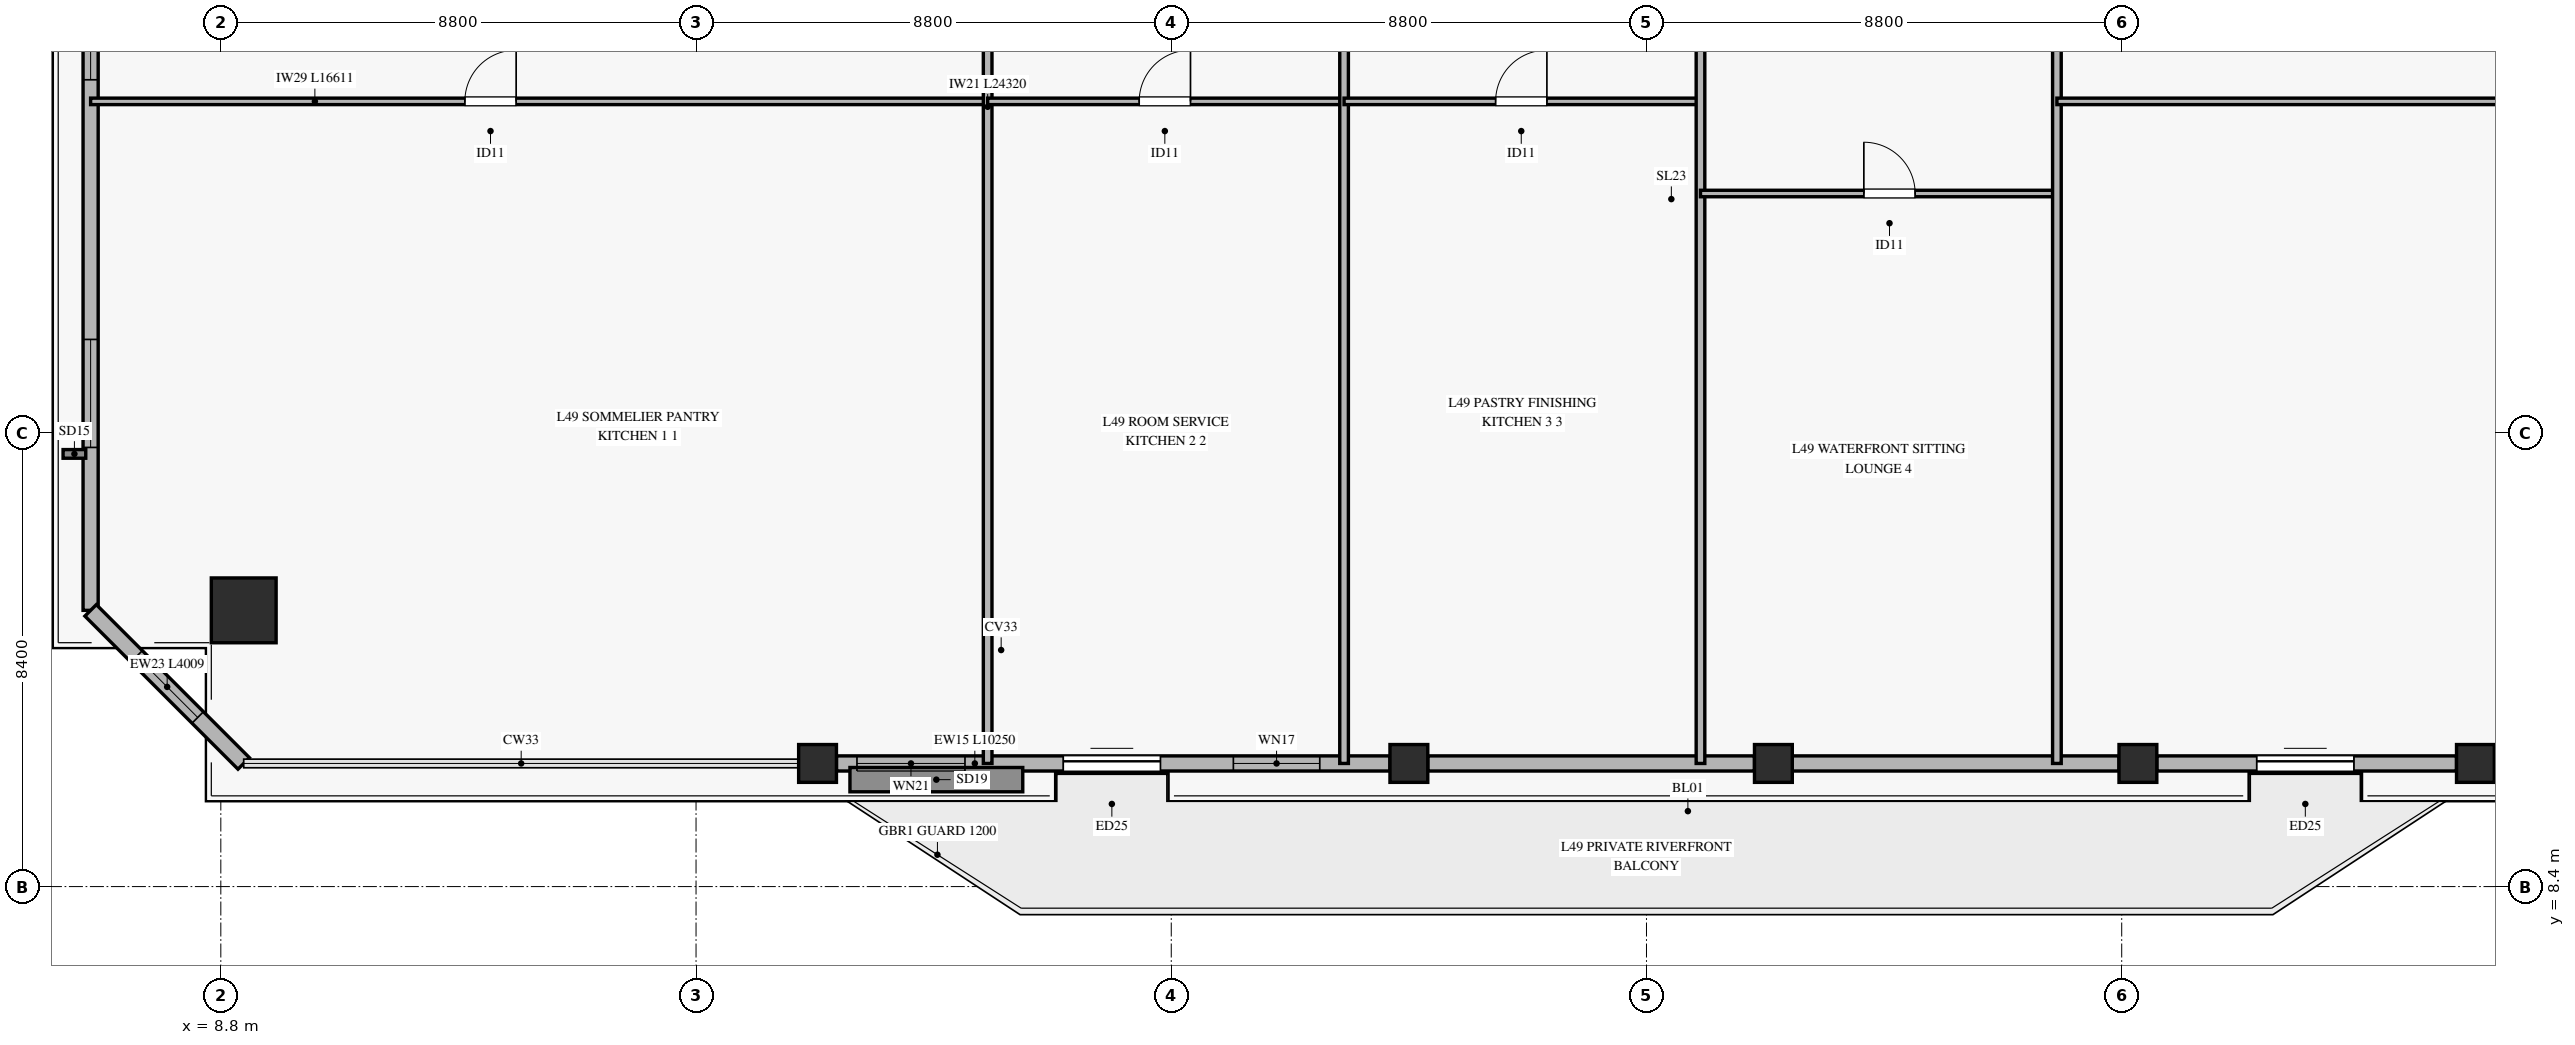
"""IFC4 building model, lengths in metres.
Left out: names, types, materials, properties, quantities, classifications, styles, units other than length and angle.
Written with IfcOpenShell. Run it as: python <this file> out.ifc"""

import sys

from ifc_helpers import new_model, si_unit, direction, frame, frame_2d, origin, origin_2d, place, context, subcontext, project, spatial, rectangle, hollow_rectangle, extrude, source, transform, mapped, element, fill, save


model = new_model("IFC4")
c1 = context("Model", 3, precision=1e-05, world=origin(), true_north=direction((0.0, 1.0)))
c2 = subcontext(c1, "Body", "Model", "MODEL_VIEW")
j1 = project(units=[si_unit("LENGTHUNIT", "METRE"), si_unit("PLANEANGLEUNIT", "RADIAN")], contexts=[c1])
p1 = place(None, origin())
s1 = spatial("IfcSite", under=j1, at=p1, CompositionType="ELEMENT")
p2 = place(p1, origin())
s2 = spatial("IfcBuilding", under=s1, at=p2, CompositionType="ELEMENT")
p3 = place(p2, frame((0.0, 0.0, 195.7)))
s3 = spatial("IfcBuildingStorey", under=s2, at=p3, CompositionType="ELEMENT", Elevation=195.7)
m1 = source(origin(), c2, "Body", "SweptSolid", [
    extrude(hollow_rectangle(XDim=1.2, YDim=1.2, WallThickness=0.055, at=origin_2d()), origin(), (0.0, 0.0, 1.0), 3.27),
])
p4 = place(p3, frame((9.224, 13.515, 0.0), z_axis=(0.0, 0.0, 1.0), x_axis=(1.0, 0.0, 0.0)))
e1 = element("IfcColumn", 1, at=p4, inside=s3, PredefinedType="COLUMN", context=c2, shape_type="MappedRepresentation", body=[
    mapped(m1, transform((0.0, 0.0, 0.0), x_axis=(1.0, 0.0, 0.0), y_axis=(0.0, 1.0, 0.0), z_axis=(0.0, 0.0, 1.0), scale=1.0)),
])
m2 = source(origin(), c2, "Body", "SweptSolid", [
    extrude(hollow_rectangle(XDim=0.7, YDim=0.7, WallThickness=0.032, at=origin_2d()), origin(), (0.0, 0.0, 1.0), 3.27),
])
for number, where, z_axis, x_axis in (
    (2, (19.85, 10.68, 0.0), (0.0, 0.0, 1.0), (1.0, 0.0, 0.0)),
    (3, (30.8, 10.68, 0.0), (0.0, 0.0, 1.0), (1.0, 0.0, 0.0)),
    (4, (37.55, 10.68, 0.0), (0.0, 0.0, 1.0), (1.0, 0.0, 0.0)),
    (5, (44.3, 10.68, 0.0), (0.0, 0.0, 1.0), (1.0, 0.0, 0.0)),
    (6, (50.55, 10.68, 0.0), (0.0, 0.0, 1.0), (1.0, 0.0, 0.0)),
):
    element("IfcColumn", number, at=place(p3, frame(where, z_axis=z_axis, x_axis=x_axis)), inside=s3, PredefinedType="COLUMN", context=c2, shape_type="MappedRepresentation", body=[
        mapped(m2, transform((0.0, 0.0, 0.0), x_axis=(1.0, 0.0, 0.0), y_axis=(0.0, 1.0, 0.0), z_axis=(0.0, 0.0, 1.0), scale=1.0)),
    ])
p5 = place(p3, frame((20.2, 10.68, 0.0), z_axis=(0.0, 0.0, 1.0), x_axis=(1.0, 0.0, 0.0)))
e7 = element("IfcWall", 7, at=p5, inside=s3, PredefinedType="SOLIDWALL", context=c2, shape_type="SweptSolid", body=[
    extrude(rectangle(XDim=10.25, YDim=0.28, at=frame_2d((5.125, 0.0))), origin(), (0.0, 0.0, 1.0), 2.75),
])
p6 = place(p5, frame((4.2, 0.0, 0.0)))
e8 = element("IfcOpeningElement", 8, at=p6, cuts=e7, PredefinedType="OPENING", context=c2, shape_type="SweptSolid", body=[
    extrude(rectangle(XDim=1.8, YDim=2.25, at=frame_2d((0.9, 1.125))), frame((0.0, 0.15, 0.0), z_axis=(0.0, -1.0, 0.0), x_axis=(1.0, 0.0, 0.0)), (0.0, 0.0, 1.0), 0.3),
])
p7 = place(p5, frame((0.38, 0.0, 0.45)))
e9 = element("IfcOpeningElement", 9, at=p7, cuts=e7, PredefinedType="OPENING", context=c2, shape_type="SweptSolid", body=[
    extrude(rectangle(XDim=2.0, YDim=2.0, at=frame_2d((1.0, 1.0))), frame((0.0, 0.15, 0.0), z_axis=(0.0, -1.0, 0.0), x_axis=(1.0, 0.0, 0.0)), (0.0, 0.0, 1.0), 0.3),
])
p8 = place(p5, frame((7.35, 0.0, 0.45)))
e10 = element("IfcOpeningElement", 10, at=p8, cuts=e7, PredefinedType="OPENING", context=c2, shape_type="SweptSolid", body=[
    extrude(rectangle(XDim=1.6, YDim=2.0, at=frame_2d((0.8, 1.0))), frame((0.0, 0.15, 0.0), z_axis=(0.0, -1.0, 0.0), x_axis=(1.0, 0.0, 0.0)), (0.0, 0.0, 1.0), 0.3),
])
for number, where, z_axis, x_axis in (
    (11, (31.15, 10.68, 0.0), (0.0, 0.0, 1.0), (1.0, 0.0, 0.0)),
    (12, (37.9, 10.68, 0.0), (0.0, 0.0, 1.0), (1.0, 0.0, 0.0)),
):
    element("IfcWall", number, at=place(p3, frame(where, z_axis=z_axis, x_axis=x_axis)), inside=s3, PredefinedType="SOLIDWALL", context=c2, shape_type="SweptSolid", body=[
        extrude(rectangle(XDim=6.05, YDim=0.28, at=frame_2d((3.025, 0.0))), origin(), (0.0, 0.0, 1.0), 2.75),
    ])
p9 = place(p3, frame((44.65, 10.68, 0.0), z_axis=(0.0, 0.0, 1.0), x_axis=(1.0, 0.0, 0.0)))
e13 = element("IfcWall", 13, at=p9, inside=s3, PredefinedType="SOLIDWALL", context=c2, shape_type="SweptSolid", body=[
    extrude(rectangle(XDim=5.55, YDim=0.28, at=frame_2d((2.775, 0.0))), origin(), (0.0, 0.0, 1.0), 2.75),
])
p10 = place(p9, frame((1.85, 0.0, 0.0)))
e14 = element("IfcOpeningElement", 14, at=p10, cuts=e13, PredefinedType="OPENING", context=c2, shape_type="SweptSolid", body=[
    extrude(rectangle(XDim=1.8, YDim=2.25, at=frame_2d((0.9, 1.125))), frame((0.0, 0.15, 0.0), z_axis=(0.0, -1.0, 0.0), x_axis=(1.0, 0.0, 0.0)), (0.0, 0.0, 1.0), 0.3),
])
p11 = place(p3, frame((6.389, 13.515, 0.0), z_axis=(0.0, 0.0, 1.0), x_axis=(0.0, 1.0, 0.0)))
e15 = element("IfcWall", 15, at=p11, inside=s3, PredefinedType="SOLIDWALL", context=c2, shape_type="SweptSolid", body=[
    extrude(rectangle(XDim=14.525, YDim=0.28, at=frame_2d((7.263, 0.0))), origin(), (0.0, 0.0, 1.0), 2.75),
])
p12 = place(p11, frame((3.017, 0.0, 0.45)))
e16 = element("IfcOpeningElement", 16, at=p12, cuts=e15, PredefinedType="OPENING", context=c2, shape_type="SweptSolid", body=[
    extrude(rectangle(XDim=2.0, YDim=2.0, at=frame_2d((1.0, 1.0))), frame((0.0, 0.15, 0.0), z_axis=(0.0, -1.0, 0.0), x_axis=(1.0, 0.0, 0.0)), (0.0, 0.0, 1.0), 0.3),
])
p13 = place(p11, frame((9.825, 0.0, 0.45)))
e17 = element("IfcOpeningElement", 17, at=p13, cuts=e15, PredefinedType="OPENING", context=c2, shape_type="SweptSolid", body=[
    extrude(rectangle(XDim=2.0, YDim=2.0, at=frame_2d((1.0, 1.0))), frame((0.0, 0.15, 0.0), z_axis=(0.0, -1.0, 0.0), x_axis=(1.0, 0.0, 0.0)), (0.0, 0.0, 1.0), 0.3),
])
p14 = place(p3, frame((6.389, 13.515, 0.0), z_axis=(0.0, 0.0, 1.0), x_axis=(0.707137226464, -0.707076334599, 0.0)))
e18 = element("IfcWall", 18, at=p14, inside=s3, PredefinedType="SOLIDWALL", context=c2, shape_type="SweptSolid", body=[
    extrude(rectangle(XDim=4.01, YDim=0.3, at=frame_2d((2.005, 0.0))), origin(), (0.0, 0.0, 1.0), 2.75),
])
p15 = place(p14, frame((1.205, 0.0, 0.45)))
e19 = element("IfcOpeningElement", 19, at=p15, cuts=e18, PredefinedType="OPENING", context=c2, shape_type="SweptSolid", body=[
    extrude(rectangle(XDim=1.6, YDim=2.0, at=frame_2d((0.8, 1.0))), frame((0.0, 0.16, 0.0), z_axis=(0.0, -1.0, 0.0), x_axis=(1.0, 0.0, 0.0)), (0.0, 0.0, 1.0), 0.32),
])
p16 = place(p3, frame((6.389, 22.94, 0.0), z_axis=(0.0, 0.0, 1.0), x_axis=(1.0, 0.0, 0.0)))
e20 = element("IfcWall", 20, at=p16, inside=s3, PredefinedType="PARTITIONING", context=c2, shape_type="SweptSolid", body=[
    extrude(rectangle(XDim=16.611, YDim=0.12, at=frame_2d((8.306, 0.0))), origin(), (0.0, 0.0, 1.0), 2.455),
])
p17 = place(p16, frame((6.93, 0.0, 0.0)))
e21 = element("IfcOpeningElement", 21, at=p17, cuts=e20, PredefinedType="OPENING", context=c2, shape_type="SweptSolid", body=[
    extrude(rectangle(XDim=0.95, YDim=2.1, at=frame_2d((0.475, 1.05))), frame((0.0, 0.07, 0.0), z_axis=(0.0, -1.0, 0.0), x_axis=(1.0, 0.0, 0.0)), (0.0, 0.0, 1.0), 0.14),
])
p18 = place(p3, frame((23.0, 10.68, 0.0), z_axis=(0.0, 0.0, 1.0), x_axis=(0.0, 1.0, 0.0)))
e22 = element("IfcWall", 22, at=p18, inside=s3, PredefinedType="PARTITIONING", context=c2, shape_type="SweptSolid", body=[
    extrude(rectangle(XDim=24.32, YDim=0.16, at=frame_2d((12.16, 0.0))), origin(), (0.0, 0.0, 1.0), 2.755),
])
p19 = place(p3, frame((23.0, 22.94, 0.0), z_axis=(0.0, 0.0, 1.0), x_axis=(1.0, 0.0, 0.0)))
e23 = element("IfcWall", 23, at=p19, inside=s3, PredefinedType="PARTITIONING", context=c2, shape_type="SweptSolid", body=[
    extrude(rectangle(XDim=6.6, YDim=0.12, at=frame_2d((3.3, 0.0))), origin(), (0.0, 0.0, 1.0), 3.27),
])
p20 = place(p19, frame((2.806, 0.0, 0.0)))
e24 = element("IfcOpeningElement", 24, at=p20, cuts=e23, PredefinedType="OPENING", context=c2, shape_type="SweptSolid", body=[
    extrude(rectangle(XDim=0.95, YDim=2.1, at=frame_2d((0.475, 1.05))), frame((0.0, 0.07, 0.0), z_axis=(0.0, -1.0, 0.0), x_axis=(1.0, 0.0, 0.0)), (0.0, 0.0, 1.0), 0.14),
])
p21 = place(p3, frame((29.6, 10.68, 0.0), z_axis=(0.0, 0.0, 1.0), x_axis=(0.0, 1.0, 0.0)))
e25 = element("IfcWall", 25, at=p21, inside=s3, PredefinedType="PARTITIONING", context=c2, shape_type="SweptSolid", body=[
    extrude(rectangle(XDim=24.32, YDim=0.16, at=frame_2d((12.16, 0.0))), origin(), (0.0, 0.0, 1.0), 2.755),
])
p22 = place(p3, frame((29.6, 22.94, 0.0), z_axis=(0.0, 0.0, 1.0), x_axis=(1.0, 0.0, 0.0)))
e26 = element("IfcWall", 26, at=p22, inside=s3, PredefinedType="PARTITIONING", context=c2, shape_type="SweptSolid", body=[
    extrude(rectangle(XDim=6.6, YDim=0.12, at=frame_2d((3.3, 0.0))), origin(), (0.0, 0.0, 1.0), 2.455),
])
p23 = place(p22, frame((2.806, 0.0, 0.0)))
e27 = element("IfcOpeningElement", 27, at=p23, cuts=e26, PredefinedType="OPENING", context=c2, shape_type="SweptSolid", body=[
    extrude(rectangle(XDim=0.95, YDim=2.1, at=frame_2d((0.475, 1.05))), frame((0.0, 0.07, 0.0), z_axis=(0.0, -1.0, 0.0), x_axis=(1.0, 0.0, 0.0)), (0.0, 0.0, 1.0), 0.14),
])
p24 = place(p3, frame((36.2, 10.68, 0.0), z_axis=(0.0, 0.0, 1.0), x_axis=(0.0, 1.0, 0.0)))
e28 = element("IfcWall", 28, at=p24, inside=s3, PredefinedType="PARTITIONING", context=c2, shape_type="SweptSolid", body=[
    extrude(rectangle(XDim=24.32, YDim=0.16, at=frame_2d((12.16, 0.0))), origin(), (0.0, 0.0, 1.0), 2.755),
])
p25 = place(p3, frame((36.2, 21.234, 0.0), z_axis=(0.0, 0.0, 1.0), x_axis=(1.0, 0.0, 0.0)))
e29 = element("IfcWall", 29, at=p25, inside=s3, PredefinedType="PARTITIONING", context=c2, shape_type="SweptSolid", body=[
    extrude(rectangle(XDim=6.6, YDim=0.12, at=frame_2d((3.3, 0.0))), origin(), (0.0, 0.0, 1.0), 2.455),
])
p26 = place(p25, frame((3.025, 0.0, 0.0)))
e30 = element("IfcOpeningElement", 30, at=p26, cuts=e29, PredefinedType="OPENING", context=c2, shape_type="SweptSolid", body=[
    extrude(rectangle(XDim=0.95, YDim=2.1, at=frame_2d((0.475, 1.05))), frame((0.0, 0.07, 0.0), z_axis=(0.0, -1.0, 0.0), x_axis=(1.0, 0.0, 0.0)), (0.0, 0.0, 1.0), 0.14),
])
p27 = place(p3, frame((42.8, 10.68, 0.0), z_axis=(0.0, 0.0, 1.0), x_axis=(0.0, 1.0, 0.0)))
e31 = element("IfcWall", 31, at=p27, inside=s3, PredefinedType="PARTITIONING", context=c2, shape_type="SweptSolid", body=[
    extrude(rectangle(XDim=24.32, YDim=0.16, at=frame_2d((12.16, 0.0))), origin(), (0.0, 0.0, 1.0), 2.755),
])
p28 = place(p3, frame((42.8, 22.94, 0.0), z_axis=(0.0, 0.0, 1.0), x_axis=(1.0, 0.0, 0.0)))
e32 = element("IfcWall", 32, at=p28, inside=s3, PredefinedType="PARTITIONING", context=c2, shape_type="SweptSolid", body=[
    extrude(rectangle(XDim=21.212, YDim=0.12, at=frame_2d((10.606, 0.0))), origin(), (0.0, 0.0, 1.0), 2.455),
])
p29 = place(p28, frame((8.571, 0.0, 0.0)))
e33 = element("IfcOpeningElement", 33, at=p29, cuts=e32, PredefinedType="OPENING", context=c2, shape_type="SweptSolid", body=[
    extrude(rectangle(XDim=0.95, YDim=2.1, at=frame_2d((0.475, 1.05))), frame((0.0, 0.07, 0.0), z_axis=(0.0, -1.0, 0.0), x_axis=(1.0, 0.0, 0.0)), (0.0, 0.0, 1.0), 0.14),
])
m3 = source(origin(), c2, "Body", "SweptSolid", [
    extrude(rectangle(XDim=1.8, YDim=2.25, at=frame_2d((0.9, 1.125))), frame((0.0, 0.025, 0.0), z_axis=(0.0, -1.0, 0.0), x_axis=(1.0, 0.0, 0.0)), (0.0, 0.0, 1.0), 0.05),
])
p30 = place(p6, origin())
e34 = element("IfcDoor", 34, at=p30, inside=s3, OperationType="SLIDING_TO_LEFT", PredefinedType="DOOR", context=c2, shape_type="MappedRepresentation", body=[
    mapped(m3, transform((0.0, 0.0, 0.0), x_axis=(1.0, 0.0, 0.0), y_axis=(0.0, 1.0, 0.0), z_axis=(0.0, 0.0, 1.0), scale=1.0)),
])
fill(e8, e34)
m4 = source(origin(), c2, "Body", "SweptSolid", [
    extrude(rectangle(XDim=2.0, YDim=2.0, at=frame_2d((1.0, 1.0))), frame((0.0, 0.03, 0.0), z_axis=(0.0, -1.0, 0.0), x_axis=(1.0, 0.0, 0.0)), (0.0, 0.0, 1.0), 0.06),
])
p31 = place(p7, origin())
e35 = element("IfcWindow", 35, at=p31, inside=s3, PartitioningType="SINGLE_PANEL", PredefinedType="WINDOW", context=c2, shape_type="MappedRepresentation", body=[
    mapped(m4, transform((0.0, 0.0, 0.0), x_axis=(1.0, 0.0, 0.0), y_axis=(0.0, 1.0, 0.0), z_axis=(0.0, 0.0, 1.0), scale=1.0)),
])
fill(e9, e35)
m5 = source(origin(), c2, "Body", "SweptSolid", [
    extrude(rectangle(XDim=1.6, YDim=2.0, at=frame_2d((0.8, 1.0))), frame((0.0, 0.03, 0.0), z_axis=(0.0, -1.0, 0.0), x_axis=(1.0, 0.0, 0.0)), (0.0, 0.0, 1.0), 0.06),
])
p32 = place(p8, origin())
e36 = element("IfcWindow", 36, at=p32, inside=s3, PartitioningType="SINGLE_PANEL", PredefinedType="WINDOW", context=c2, shape_type="MappedRepresentation", body=[
    mapped(m5, transform((0.0, 0.0, 0.0), x_axis=(1.0, 0.0, 0.0), y_axis=(0.0, 1.0, 0.0), z_axis=(0.0, 0.0, 1.0), scale=1.0)),
])
fill(e10, e36)
p33 = place(p10, origin())
e37 = element("IfcDoor", 37, at=p33, inside=s3, OperationType="SLIDING_TO_LEFT", PredefinedType="DOOR", context=c2, shape_type="MappedRepresentation", body=[
    mapped(m3, transform((0.0, 0.0, 0.0), x_axis=(1.0, 0.0, 0.0), y_axis=(0.0, 1.0, 0.0), z_axis=(0.0, 0.0, 1.0), scale=1.0)),
])
fill(e14, e37)
p34 = place(p12, origin())
e38 = element("IfcWindow", 38, at=p34, inside=s3, PartitioningType="SINGLE_PANEL", PredefinedType="WINDOW", context=c2, shape_type="MappedRepresentation", body=[
    mapped(m4, transform((0.0, 0.0, 0.0), x_axis=(1.0, 0.0, 0.0), y_axis=(0.0, 1.0, 0.0), z_axis=(0.0, 0.0, 1.0), scale=1.0)),
])
fill(e16, e38)
p35 = place(p13, origin())
e39 = element("IfcWindow", 39, at=p35, inside=s3, PartitioningType="SINGLE_PANEL", PredefinedType="WINDOW", context=c2, shape_type="MappedRepresentation", body=[
    mapped(m4, transform((0.0, 0.0, 0.0), x_axis=(1.0, 0.0, 0.0), y_axis=(0.0, 1.0, 0.0), z_axis=(0.0, 0.0, 1.0), scale=1.0)),
])
fill(e17, e39)
p36 = place(p15, origin())
e40 = element("IfcWindow", 40, at=p36, inside=s3, PartitioningType="SINGLE_PANEL", PredefinedType="WINDOW", context=c2, shape_type="MappedRepresentation", body=[
    mapped(m5, transform((0.0, 0.0, 0.0), x_axis=(1.0, 0.0, 0.0), y_axis=(0.0, 1.0, 0.0), z_axis=(0.0, 0.0, 1.0), scale=1.0)),
])
fill(e19, e40)
m6 = source(origin(), c2, "Body", "SweptSolid", [
    extrude(rectangle(XDim=0.95, YDim=2.1, at=frame_2d((0.475, 1.05))), frame((0.0, 0.025, 0.0), z_axis=(0.0, -1.0, 0.0), x_axis=(1.0, 0.0, 0.0)), (0.0, 0.0, 1.0), 0.05),
])
p37 = place(p17, origin())
e41 = element("IfcDoor", 41, at=p37, inside=s3, OperationType="SINGLE_SWING_RIGHT", PredefinedType="DOOR", context=c2, shape_type="MappedRepresentation", body=[
    mapped(m6, transform((0.0, 0.0, 0.0), x_axis=(1.0, 0.0, 0.0), y_axis=(0.0, 1.0, 0.0), z_axis=(0.0, 0.0, 1.0), scale=1.0)),
])
fill(e21, e41)
p38 = place(p20, origin())
e42 = element("IfcDoor", 42, at=p38, inside=s3, OperationType="SINGLE_SWING_RIGHT", PredefinedType="DOOR", context=c2, shape_type="MappedRepresentation", body=[
    mapped(m6, transform((0.0, 0.0, 0.0), x_axis=(1.0, 0.0, 0.0), y_axis=(0.0, 1.0, 0.0), z_axis=(0.0, 0.0, 1.0), scale=1.0)),
])
fill(e24, e42)
p39 = place(p23, origin())
e43 = element("IfcDoor", 43, at=p39, inside=s3, OperationType="SINGLE_SWING_RIGHT", PredefinedType="DOOR", context=c2, shape_type="MappedRepresentation", body=[
    mapped(m6, transform((0.0, 0.0, 0.0), x_axis=(1.0, 0.0, 0.0), y_axis=(0.0, 1.0, 0.0), z_axis=(0.0, 0.0, 1.0), scale=1.0)),
])
fill(e27, e43)
p40 = place(p26, origin())
e44 = element("IfcDoor", 44, at=p40, inside=s3, OperationType="SINGLE_SWING_LEFT", PredefinedType="DOOR", context=c2, shape_type="MappedRepresentation", body=[
    mapped(m6, transform((0.0, 0.0, 0.0), x_axis=(1.0, 0.0, 0.0), y_axis=(0.0, 1.0, 0.0), z_axis=(0.0, 0.0, 1.0), scale=1.0)),
])
fill(e30, e44)
save(model, sys.argv[1])
